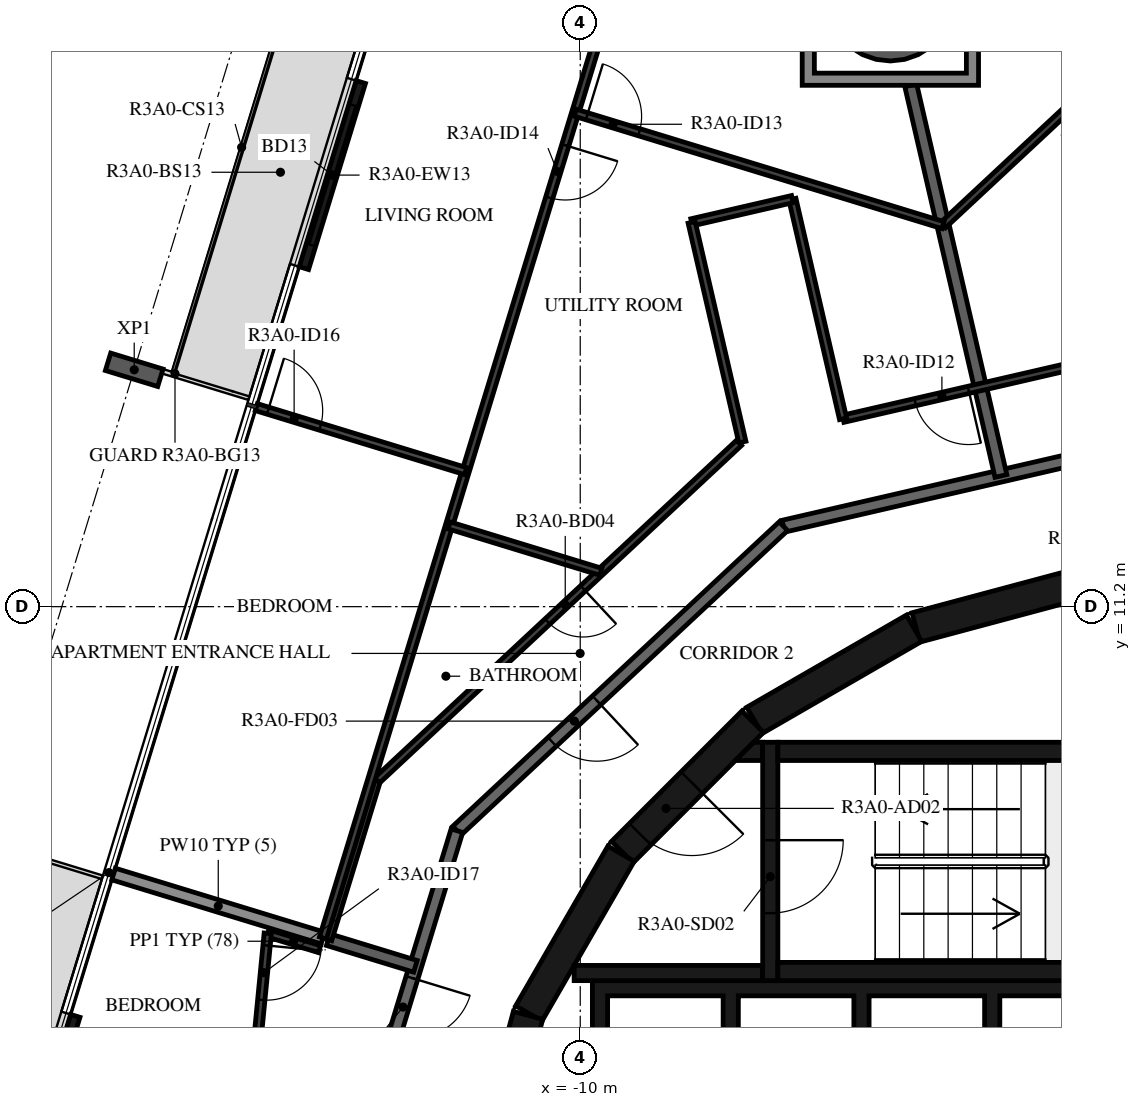
"""IFC4 building model, lengths in metres.
Left out: names, types, materials, properties, quantities, classifications, styles, units other than length and angle.
Written with IfcOpenShell. Run it as: python <this file> out.ifc"""

import sys

from ifc_helpers import new_model, si_unit, direction, frame, frame_2d, origin, origin_2d, place, context, subcontext, project, spatial, polyline, rectangle, hollow_circle, i_section, outline, extrude, element, fill, save


model = new_model("IFC4")
c1 = context("Model", 3, precision=1e-05, world=origin(), true_north=direction((0.0, 1.0)))
c2 = subcontext(c1, "Body", "Model", "MODEL_VIEW")
j1 = project(units=[si_unit("LENGTHUNIT", "METRE"), si_unit("PLANEANGLEUNIT", "RADIAN")], contexts=[c1])
p1 = place(None, origin())
s1 = spatial("IfcSite", under=j1, at=p1, CompositionType="ELEMENT")
p2 = place(p1, origin())
s2 = spatial("IfcBuilding", under=s1, at=p2, CompositionType="ELEMENT")
p3 = place(p2, frame((0.0, 0.0, 120.4)))
s3 = spatial("IfcBuildingStorey", under=s2, at=p3, CompositionType="ELEMENT", Elevation=120.4)
p4 = place(p3, frame((-4.9, 21.223, -0.38), z_axis=(0.0, 0.0, 1.0), x_axis=(1.0, 0.0, 0.0)))
e1 = element("IfcColumn", 1, at=p4, inside=s3, PredefinedType="COLUMN", context=c2, shape_type="SweptSolid", body=[
    extrude(hollow_circle(Radius=1.05, WallThickness=0.05, at=origin_2d()), origin(), (0.0, 0.0, 1.0), 3.5),
])
p5 = place(p3, frame((-17.335, 15.095, -0.38), z_axis=(0.0, 0.0, 1.0), x_axis=(0.29237190653, 0.956304694264, 0.0)))
e2 = element("IfcColumn", 2, at=p5, inside=s3, PredefinedType="COLUMN", context=c2, shape_type="SweptSolid", body=[
    extrude(i_section(OverallWidth=0.3, OverallDepth=0.9, WebThickness=0.019, FlangeThickness=0.035, FilletRadius=0.03, at=origin_2d()), origin(), (0.0, 0.0, 1.0), 3.5),
])
p6 = place(p3, frame((-13.609, 19.827, 0.0), z_axis=(0.0, 0.0, 1.0), x_axis=(-0.292348395078, -0.956311882126, 0.0)))
e3 = element("IfcWall", 3, at=p6, inside=s3, PredefinedType="STANDARD", context=c2, shape_type="SweptSolid", body=[
    extrude(rectangle(XDim=3.2, YDim=0.16, at=frame_2d((1.6, 0.0))), origin(), (0.0, 0.0, 1.0), 3.12),
])
p7 = place(p6, frame((0.4, 0.0, 0.0)))
e4 = element("IfcOpeningElement", 4, at=p7, cuts=e3, PredefinedType="OPENING", context=c2, shape_type="SweptSolid", body=[
    extrude(rectangle(XDim=2.4, YDim=2.4, at=frame_2d((1.2, 1.2))), frame((0.0, 0.09, 0.0), z_axis=(0.0, -1.0, 0.0), x_axis=(1.0, 0.0, 0.0)), (0.0, 0.0, 1.0), 0.18),
])
p8 = place(p3, frame((-18.304, 4.47, 0.0), z_axis=(0.0, 0.0, 1.0), x_axis=(-0.292348395078, -0.956311882126, 0.0)))
e5 = element("IfcWall", 5, at=p8, inside=s3, PredefinedType="STANDARD", context=c2, shape_type="SweptSolid", body=[
    extrude(rectangle(XDim=3.2, YDim=0.16, at=frame_2d((1.6, 0.0))), origin(), (0.0, 0.0, 1.0), 3.12),
])
p9 = place(p8, frame((0.4, 0.0, 0.0)))
e6 = element("IfcOpeningElement", 6, at=p9, cuts=e5, PredefinedType="OPENING", context=c2, shape_type="SweptSolid", body=[
    extrude(rectangle(XDim=2.4, YDim=2.4, at=frame_2d((1.2, 1.2))), frame((0.0, 0.09, 0.0), z_axis=(0.0, -1.0, 0.0), x_axis=(1.0, 0.0, 0.0)), (0.0, 0.0, 1.0), 0.18),
])
for number, where, z_axis, x_axis in (
    (7, (-1.55, 11.643, 0.0), (0.0, 0.0, 1.0), (-0.966, -0.259, 0.0)),
    (8, (-4.51, 10.845, 0.0), (0.0, 0.0, 1.0), (-0.866, -0.5, 0.0)),
):
    element("IfcWall", number, at=place(p3, frame(where, z_axis=z_axis, x_axis=x_axis)), inside=s3, PredefinedType="SHEAR", context=c2, shape_type="SweptSolid", body=[
        extrude(rectangle(XDim=3.033, YDim=0.5, at=frame_2d((1.516, 0.0))), origin(), (0.0, 0.0, 1.0), 3.12),
    ])
p10 = place(p3, frame((-7.164, 9.308, 0.0), z_axis=(0.0, 0.0, 1.0), x_axis=(-0.707106781187, -0.707106781187, 0.0)))
e9 = element("IfcWall", 9, at=p10, inside=s3, PredefinedType="SHEAR", context=c2, shape_type="SweptSolid", body=[
    extrude(rectangle(XDim=3.032, YDim=0.5, at=frame_2d((1.516, 0.0))), origin(), (0.0, 0.0, 1.0), 3.12),
])
p11 = place(p10, frame((1.416, 0.0, 0.0)))
e10 = element("IfcOpeningElement", 10, at=p11, cuts=e9, PredefinedType="OPENING", context=c2, shape_type="SweptSolid", body=[
    extrude(rectangle(XDim=1.2, YDim=2.1, at=frame_2d((0.6, 1.05))), frame((0.0, 0.26, 0.0), z_axis=(0.0, -1.0, 0.0), x_axis=(1.0, 0.0, 0.0)), (0.0, 0.0, 1.0), 0.52),
])
for number, where, z_axis, x_axis in (
    (11, (-9.329, 7.137, 0.0), (0.0, 0.0, 1.0), (-0.5, -0.866, 0.0)),
    (12, (-10.858, 4.479, 0.0), (0.0, 0.0, 1.0), (-0.259, -0.966, 0.0)),
):
    element("IfcWall", number, at=place(p3, frame(where, z_axis=z_axis, x_axis=x_axis)), inside=s3, PredefinedType="SHEAR", context=c2, shape_type="SweptSolid", body=[
        extrude(rectangle(XDim=3.033, YDim=0.5, at=frame_2d((1.516, 0.0))), origin(), (0.0, 0.0, 1.0), 3.12),
    ])
for number, where, z_axis, x_axis in (
    (13, (-6.75, 5.2, 0.0), (0.0, 0.0, 1.0), (1.0, 0.0, 0.0)),
    (14, (-6.75, 8.82, 0.0), (0.0, 0.0, 1.0), (1.0, 0.0, 0.0)),
):
    element("IfcWall", number, at=place(p3, frame(where, z_axis=z_axis, x_axis=x_axis)), inside=s3, PredefinedType="SHEAR", context=c2, shape_type="SweptSolid", body=[
        extrude(rectangle(XDim=6.75, YDim=0.3, at=frame_2d((3.375, 0.0))), origin(), (0.0, 0.0, 1.0), 3.12),
    ])
p12 = place(p3, frame((-6.875, 8.97, 0.0), z_axis=(0.0, 0.0, 1.0), x_axis=(0.0, -1.0, 0.0)))
e15 = element("IfcWall", 15, at=p12, inside=s3, PredefinedType="SHEAR", context=c2, shape_type="SweptSolid", body=[
    extrude(rectangle(XDim=3.92, YDim=0.25, at=frame_2d((1.96, 0.0))), origin(), (0.0, 0.0, 1.0), 3.12),
])
p13 = place(p12, frame((1.61, 0.0, 0.0)))
e16 = element("IfcOpeningElement", 16, at=p13, cuts=e15, PredefinedType="OPENING", context=c2, shape_type="SweptSolid", body=[
    extrude(rectangle(XDim=1.2, YDim=2.1, at=frame_2d((0.6, 1.05))), frame((0.0, 0.135, 0.0), z_axis=(0.0, -1.0, 0.0), x_axis=(1.0, 0.0, 0.0)), (0.0, 0.0, 1.0), 0.27),
])
p14 = place(p3, frame((-7.0, 5.175, 0.0), z_axis=(0.0, 0.0, 1.0), x_axis=(-1.0, 0.0, 0.0)))
e17 = element("IfcWall", 17, at=p14, inside=s3, PredefinedType="SHEAR", context=c2, shape_type="SweptSolid", body=[
    extrude(rectangle(XDim=3.1, YDim=0.25, at=frame_2d((1.55, 0.0))), origin(), (0.0, 0.0, 1.0), 3.12),
])
p15 = place(p3, origin())
e18 = element("IfcWall", 18, at=p15, inside=s3, PredefinedType="SHEAR", context=c2, shape_type="SweptSolid", body=[
    extrude(outline(polyline([(-7.148, 8.97), (-7.0, 8.97), (-7.0, 8.67), (-7.448, 8.67), (-7.148, 8.97)])), origin(), (0.0, 0.0, 1.0), 3.12),
])
p16 = place(p3, origin())
e19 = element("IfcWall", 19, at=p16, inside=s3, PredefinedType="SHEAR", context=c2, shape_type="SweptSolid", body=[
    extrude(outline(polyline([(-9.55, 4.8), (-7.65, 4.8), (-7.65, 1.9), (-7.4, 1.9), (-7.4, 4.8), (-5.5, 4.8), (-5.5, 1.9), (-5.25, 1.9), (-5.25, 4.8), (-3.35, 4.8), (-3.35, 1.9), (-3.1, 1.9), (-3.1, 4.8), (-1.2, 4.8), (-1.2, 1.9), (-0.95, 1.9), (-0.95, 4.8), (0.95, 4.8), (0.95, 1.9), (1.2, 1.9), (1.2, 4.8), (3.1, 4.8), (3.1, 1.9), (3.35, 1.9), (3.35, 4.8), (5.25, 4.8), (5.25, 1.9), (5.5, 1.9), (5.5, 4.8), (7.4, 4.8), (7.4, 1.9), (7.65, 1.9), (7.65, 4.8), (9.55, 4.8), (9.55, 1.9), (9.8, 1.9), (9.8, 4.8), (9.8, 5.05), (-9.8, 5.05), (-9.8, 4.8), (-9.8, 1.9), (-9.55, 1.9), (-9.55, 4.8)])), origin(), (0.0, 0.0, 1.0), 3.12),
])
p17 = place(p3, frame((0.495, 14.175, 0.0), z_axis=(0.0, 0.0, 1.0), x_axis=(-0.974376622151, -0.224922649383, 0.0)))
e20 = element("IfcWall", 20, at=p17, inside=s3, PredefinedType="STANDARD", context=c2, shape_type="SweptSolid", body=[
    extrude(rectangle(XDim=7.342, YDim=0.2, at=frame_2d((3.671, 0.0))), origin(), (0.0, 0.0, 1.0), 3.12),
])
p18 = place(p3, frame((-6.659, 12.523, 0.0), z_axis=(0.0, 0.0, 1.0), x_axis=(-0.731350455479, -0.682001841105, 0.0)))
e21 = element("IfcWall", 21, at=p18, inside=s3, PredefinedType="STANDARD", context=c2, shape_type="SweptSolid", body=[
    extrude(rectangle(XDim=7.342, YDim=0.2, at=frame_2d((3.671, 0.0))), origin(), (0.0, 0.0, 1.0), 3.12),
])
p19 = place(p18, frame((4.2, 0.0, 0.0)))
e22 = element("IfcOpeningElement", 22, at=p19, cuts=e21, PredefinedType="OPENING", context=c2, shape_type="SweptSolid", body=[
    extrude(rectangle(XDim=1.0, YDim=2.1, at=frame_2d((0.5, 1.05))), frame((0.0, 0.11, 0.0), z_axis=(0.0, -1.0, 0.0), x_axis=(1.0, 0.0, 0.0)), (0.0, 0.0, 1.0), 0.22),
])
p20 = place(p3, frame((-12.028, 7.516, 0.0), z_axis=(0.0, 0.0, 1.0), x_axis=(-0.292365533182, -0.956306642771, 0.0)))
e23 = element("IfcWall", 23, at=p20, inside=s3, PredefinedType="STANDARD", context=c2, shape_type="SweptSolid", body=[
    extrude(rectangle(XDim=7.342, YDim=0.2, at=frame_2d((3.671, 0.0))), origin(), (0.0, 0.0, 1.0), 3.12),
])
p21 = place(p20, frame((2.533, 0.0, 0.0)))
e24 = element("IfcOpeningElement", 24, at=p21, cuts=e23, PredefinedType="OPENING", context=c2, shape_type="SweptSolid", body=[
    extrude(rectangle(XDim=1.0, YDim=2.1, at=frame_2d((0.5, 1.05))), frame((0.0, 0.11, 0.0), z_axis=(0.0, -1.0, 0.0), x_axis=(1.0, 0.0, 0.0)), (0.0, 0.0, 1.0), 0.22),
])
p22 = place(p3, frame((-4.565, 19.773, 0.0), z_axis=(0.0, 0.0, 1.0), x_axis=(0.224940633072, -0.974372470667, 0.0)))
e25 = element("IfcWall", 25, at=p22, inside=s3, PredefinedType="STANDARD", context=c2, shape_type="SweptSolid", body=[
    extrude(rectangle(XDim=6.594, YDim=0.2, at=frame_2d((3.297, 0.0))), origin(), (0.0, 0.0, 1.0), 3.12),
])
p23 = place(p3, frame((-14.145, 5.724, 0.0), z_axis=(0.0, 0.0, 1.0), x_axis=(0.956266872747, -0.292495586439, 0.0)))
e26 = element("IfcWall", 26, at=p23, inside=s3, PredefinedType="STANDARD", context=c2, shape_type="SweptSolid", body=[
    extrude(rectangle(XDim=1.5, YDim=0.2, at=frame_2d((0.75, 0.0))), origin(), (0.0, 0.0, 1.0), 3.12),
])
p24 = place(p3, frame((-17.674, 6.803, 0.0), z_axis=(0.0, 0.0, 1.0), x_axis=(0.956293645939, -0.292408041504, 0.0)))
e27 = element("IfcWall", 27, at=p24, inside=s3, PredefinedType="STANDARD", context=c2, shape_type="SweptSolid", body=[
    extrude(rectangle(XDim=3.6, YDim=0.2, at=frame_2d((1.8, 0.0))), origin(), (0.0, 0.0, 1.0), 2.73),
])
p25 = place(p3, frame((-1.161, 15.332, 0.0), z_axis=(0.0, 0.0, 1.0), x_axis=(-0.974373440078, -0.224936433845, 0.0)))
e28 = element("IfcWall", 28, at=p25, inside=s3, PredefinedType="PARTITIONING", context=c2, shape_type="SweptSolid", body=[
    extrude(rectangle(XDim=4.636, YDim=0.12, at=frame_2d((2.318, 0.0))), origin(), (0.0, 0.0, 1.0), 3.12),
])
p26 = place(p25, frame((2.518, 0.0, 0.0)))
e29 = element("IfcOpeningElement", 29, at=p26, cuts=e28, PredefinedType="OPENING", context=c2, shape_type="SweptSolid", body=[
    extrude(rectangle(XDim=0.9, YDim=2.1, at=frame_2d((0.45, 1.05))), frame((0.0, 0.07, 0.0), z_axis=(0.0, -1.0, 0.0), x_axis=(1.0, 0.0, 0.0)), (0.0, 0.0, 1.0), 0.14),
])
p27 = place(p3, frame((0.591, 21.787, 0.0), z_axis=(0.0, 0.0, 1.0), x_axis=(-0.731363296574, -0.681988070588, 0.0)))
e30 = element("IfcWall", 30, at=p27, inside=s3, PredefinedType="PARTITIONING", context=c2, shape_type="SweptSolid", body=[
    extrude(rectangle(XDim=6.324, YDim=0.12, at=frame_2d((3.162, 0.0))), origin(), (0.0, 0.0, 1.0), 3.12),
])
p28 = place(p27, frame((0.6, 0.0, 0.0)))
e31 = element("IfcOpeningElement", 31, at=p28, cuts=e30, PredefinedType="OPENING", context=c2, shape_type="SweptSolid", body=[
    extrude(rectangle(XDim=0.9, YDim=2.1, at=frame_2d((0.45, 1.05))), frame((0.0, 0.07, 0.0), z_axis=(0.0, -1.0, 0.0), x_axis=(1.0, 0.0, 0.0)), (0.0, 0.0, 1.0), 0.14),
])
p29 = place(p3, frame((-5.677, 14.289, 0.0), z_axis=(0.0, 0.0, 1.0), x_axis=(-0.224960478174, 0.974367889075, 0.0)))
e32 = element("IfcWall", 32, at=p29, inside=s3, PredefinedType="PARTITIONING", context=c2, shape_type="SweptSolid", body=[
    extrude(rectangle(XDim=3.708, YDim=0.12, at=frame_2d((1.854, 0.0))), origin(), (0.0, 0.0, 1.0), 3.12),
])
p30 = place(p3, frame((-6.512, 17.902, 0.0), z_axis=(0.0, 0.0, 1.0), x_axis=(-0.974376669418, -0.224922444621, 0.0)))
e33 = element("IfcWall", 33, at=p30, inside=s3, PredefinedType="PARTITIONING", context=c2, shape_type="SweptSolid", body=[
    extrude(rectangle(XDim=1.7, YDim=0.12, at=frame_2d((0.85, 0.0))), origin(), (0.0, 0.0, 1.0), 3.12),
])
p31 = place(p3, frame((-8.168, 17.52, 0.0), z_axis=(0.0, 0.0, 1.0), x_axis=(0.224960478174, -0.974367889075, 0.0)))
e34 = element("IfcWall", 34, at=p31, inside=s3, PredefinedType="PARTITIONING", context=c2, shape_type="SweptSolid", body=[
    extrude(rectangle(XDim=3.708, YDim=0.12, at=frame_2d((1.854, 0.0))), origin(), (0.0, 0.0, 1.0), 3.12),
])
p32 = place(p3, frame((-7.388, 13.894, 0.0), z_axis=(0.0, 0.0, 1.0), x_axis=(-0.731357186721, -0.681994622729, 0.0)))
e35 = element("IfcWall", 35, at=p32, inside=s3, PredefinedType="PARTITIONING", context=c2, shape_type="SweptSolid", body=[
    extrude(rectangle(XDim=8.146, YDim=0.12, at=frame_2d((4.073, 0.0))), origin(), (0.0, 0.0, 1.0), 3.12),
])
p33 = place(p32, frame((3.509, 0.0, 0.0)))
e36 = element("IfcOpeningElement", 36, at=p33, cuts=e35, PredefinedType="OPENING", context=c2, shape_type="SweptSolid", body=[
    extrude(rectangle(XDim=0.8, YDim=2.1, at=frame_2d((0.4, 1.05))), frame((0.0, 0.07, 0.0), z_axis=(0.0, -1.0, 0.0), x_axis=(1.0, 0.0, 0.0)), (0.0, 0.0, 1.0), 0.14),
])
p34 = place(p3, frame((-13.345, 8.339, 0.0), z_axis=(0.0, 0.0, 1.0), x_axis=(-0.292316072367, -0.956321762712, 0.0)))
e37 = element("IfcWall", 37, at=p34, inside=s3, PredefinedType="PARTITIONING", context=c2, shape_type="SweptSolid", body=[
    extrude(rectangle(XDim=2.734, YDim=0.12, at=frame_2d((1.367, 0.0))), origin(), (0.0, 0.0, 1.0), 3.12),
])
p35 = place(p3, frame((-9.169, 22.31, 0.0), z_axis=(0.0, 0.0, 1.0), x_axis=(-0.29236145486, -0.956307889601, 0.0)))
e38 = element("IfcWall", 38, at=p35, inside=s3, PredefinedType="PARTITIONING", context=c2, shape_type="SweptSolid", body=[
    extrude(rectangle(XDim=17.316, YDim=0.12, at=frame_2d((8.658, 0.0))), origin(), (0.0, 0.0, 1.0), 3.12),
])
p36 = place(p35, frame((3.683, 0.0, 0.0)))
e39 = element("IfcOpeningElement", 39, at=p36, cuts=e38, PredefinedType="OPENING", context=c2, shape_type="SweptSolid", body=[
    extrude(rectangle(XDim=0.9, YDim=2.1, at=frame_2d((0.45, 1.05))), frame((0.0, 0.07, 0.0), z_axis=(0.0, -1.0, 0.0), x_axis=(1.0, 0.0, 0.0)), (0.0, 0.0, 1.0), 0.14),
])
p37 = place(p3, frame((-10.082, 19.323, 0.0), z_axis=(0.0, 0.0, 1.0), x_axis=(0.956300011431, -0.292387222936, 0.0)))
e40 = element("IfcWall", 40, at=p37, inside=s3, PredefinedType="PARTITIONING", context=c2, shape_type="SweptSolid", body=[
    extrude(rectangle(XDim=6.324, YDim=0.12, at=frame_2d((3.162, 0.0))), origin(), (0.0, 0.0, 1.0), 3.12),
])
p38 = place(p37, frame((0.2, 0.0, 0.0)))
e41 = element("IfcOpeningElement", 41, at=p38, cuts=e40, PredefinedType="OPENING", context=c2, shape_type="SweptSolid", body=[
    extrude(rectangle(XDim=0.9, YDim=2.1, at=frame_2d((0.45, 1.05))), frame((0.0, 0.07, 0.0), z_axis=(0.0, -1.0, 0.0), x_axis=(1.0, 0.0, 0.0)), (0.0, 0.0, 1.0), 0.14),
])
p39 = place(p3, frame((-12.157, 12.537, 0.0), z_axis=(0.0, 0.0, 1.0), x_axis=(0.956293441844, -0.292408708979, 0.0)))
e42 = element("IfcWall", 42, at=p39, inside=s3, PredefinedType="PARTITIONING", context=c2, shape_type="SweptSolid", body=[
    extrude(rectangle(XDim=2.609, YDim=0.12, at=frame_2d((1.305, 0.0))), origin(), (0.0, 0.0, 1.0), 3.12),
])
p40 = place(p3, frame((-15.327, 14.481, 0.0), z_axis=(0.0, 0.0, 1.0), x_axis=(0.956306810244, -0.292364985388, 0.0)))
e43 = element("IfcWall", 43, at=p40, inside=s3, PredefinedType="PARTITIONING", context=c2, shape_type="SweptSolid", body=[
    extrude(rectangle(XDim=3.6, YDim=0.12, at=frame_2d((1.8, 0.0))), origin(), (0.0, 0.0, 1.0), 2.73),
])
p41 = place(p40, frame((0.2, 0.0, 0.0)))
e44 = element("IfcOpeningElement", 44, at=p41, cuts=e43, PredefinedType="OPENING", context=c2, shape_type="SweptSolid", body=[
    extrude(rectangle(XDim=0.9, YDim=2.1, at=frame_2d((0.45, 1.05))), frame((0.0, 0.07, 0.0), z_axis=(0.0, -1.0, 0.0), x_axis=(1.0, 0.0, 0.0)), (0.0, 0.0, 1.0), 0.14),
])
p42 = place(p3, frame((-14.287, 5.568, 0.0), z_axis=(0.0, 0.0, 1.0), x_axis=(-0.956287662261, 0.292427609859, 0.0)))
e45 = element("IfcWall", 45, at=p42, inside=s3, PredefinedType="PARTITIONING", context=c2, shape_type="SweptSolid", body=[
    extrude(rectangle(XDim=0.89, YDim=0.12, at=frame_2d((0.445, 0.0))), origin(), (0.0, 0.0, 1.0), 3.12),
])
p43 = place(p3, frame((-15.138, 5.828, 0.0), z_axis=(0.0, 0.0, 1.0), x_axis=(-0.096967255409, -0.995287572201, 0.0)))
e46 = element("IfcWall", 46, at=p43, inside=s3, PredefinedType="PARTITIONING", context=c2, shape_type="SweptSolid", body=[
    extrude(rectangle(XDim=4.489, YDim=0.12, at=frame_2d((2.245, 0.0))), origin(), (0.0, 0.0, 1.0), 3.12),
])
p44 = place(p43, frame((0.2, 0.0, 0.0)))
e47 = element("IfcOpeningElement", 47, at=p44, cuts=e46, PredefinedType="OPENING", context=c2, shape_type="SweptSolid", body=[
    extrude(rectangle(XDim=0.9, YDim=2.1, at=frame_2d((0.45, 1.05))), frame((0.0, 0.07, 0.0), z_axis=(0.0, -1.0, 0.0), x_axis=(1.0, 0.0, 0.0)), (0.0, 0.0, 1.0), 0.14),
])
p45 = place(p3, origin())
e48 = element("IfcWall", 48, at=p45, inside=s3, PredefinedType="STANDARD", context=c2, shape_type="SweptSolid", body=[
    extrude(outline(polyline([(-3.45, 22.674), (-3.45, 19.773), (-6.35, 19.773), (-6.35, 22.674), (-3.45, 22.674)]), holes=[polyline([(-6.15, 19.973), (-3.65, 19.973), (-3.65, 22.473), (-6.15, 22.473), (-6.15, 19.973)])]), origin(), (0.0, 0.0, 1.0), 3.12),
])
p46 = place(p7, origin())
e49 = element("IfcDoor", 49, at=p46, inside=s3, OperationType="DOUBLE_DOOR_SLIDING", PredefinedType="DOOR", context=c2, shape_type="SweptSolid", body=[
    extrude(rectangle(XDim=2.4, YDim=2.4, at=frame_2d((1.2, 1.2))), frame((0.0, 0.025, 0.0), z_axis=(0.0, -1.0, 0.0), x_axis=(1.0, 0.0, 0.0)), (0.0, 0.0, 1.0), 0.05),
])
fill(e4, e49)
p47 = place(p13, origin())
e50 = element("IfcDoor", 50, at=p47, inside=s3, OperationType="SINGLE_SWING_LEFT", PredefinedType="DOOR", context=c2, shape_type="SweptSolid", body=[
    extrude(rectangle(XDim=1.2, YDim=2.1, at=frame_2d((0.6, 1.05))), frame((0.0, 0.025, 0.0), z_axis=(0.0, -1.0, 0.0), x_axis=(1.0, 0.0, 0.0)), (0.0, 0.0, 1.0), 0.05),
])
fill(e16, e50)
p48 = place(p11, origin())
e51 = element("IfcDoor", 51, at=p48, inside=s3, OperationType="SINGLE_SWING_RIGHT", PredefinedType="DOOR", context=c2, shape_type="SweptSolid", body=[
    extrude(rectangle(XDim=1.2, YDim=2.1, at=frame_2d((0.6, 1.05))), frame((0.0, 0.025, 0.0), z_axis=(0.0, -1.0, 0.0), x_axis=(1.0, 0.0, 0.0)), (0.0, 0.0, 1.0), 0.05),
])
fill(e10, e51)
p49 = place(p19, origin())
e52 = element("IfcDoor", 52, at=p49, inside=s3, OperationType="SINGLE_SWING_LEFT", PredefinedType="DOOR", context=c2, shape_type="SweptSolid", body=[
    extrude(rectangle(XDim=1.0, YDim=2.1, at=frame_2d((0.5, 1.05))), frame((0.0, 0.025, 0.0), z_axis=(0.0, -1.0, 0.0), x_axis=(1.0, 0.0, 0.0)), (0.0, 0.0, 1.0), 0.05),
])
fill(e22, e52)
p50 = place(p26, origin())
e53 = element("IfcDoor", 53, at=p50, inside=s3, OperationType="SINGLE_SWING_LEFT", PredefinedType="DOOR", context=c2, shape_type="SweptSolid", body=[
    extrude(rectangle(XDim=0.9, YDim=2.1, at=frame_2d((0.45, 1.05))), frame((0.0, 0.025, 0.0), z_axis=(0.0, -1.0, 0.0), x_axis=(1.0, 0.0, 0.0)), (0.0, 0.0, 1.0), 0.05),
])
fill(e29, e53)
p51 = place(p33, origin())
e54 = element("IfcDoor", 54, at=p51, inside=s3, OperationType="SINGLE_SWING_LEFT", PredefinedType="DOOR", context=c2, shape_type="SweptSolid", body=[
    extrude(rectangle(XDim=0.8, YDim=2.1, at=frame_2d((0.4, 1.05))), frame((0.0, 0.025, 0.0), z_axis=(0.0, -1.0, 0.0), x_axis=(1.0, 0.0, 0.0)), (0.0, 0.0, 1.0), 0.05),
])
fill(e36, e54)
p52 = place(p38, origin())
e55 = element("IfcDoor", 55, at=p52, inside=s3, OperationType="SINGLE_SWING_LEFT", PredefinedType="DOOR", context=c2, shape_type="SweptSolid", body=[
    extrude(rectangle(XDim=0.9, YDim=2.1, at=frame_2d((0.45, 1.05))), frame((0.0, 0.025, 0.0), z_axis=(0.0, -1.0, 0.0), x_axis=(1.0, 0.0, 0.0)), (0.0, 0.0, 1.0), 0.05),
])
fill(e41, e55)
p53 = place(p36, origin())
e56 = element("IfcDoor", 56, at=p53, inside=s3, OperationType="SINGLE_SWING_LEFT", PredefinedType="DOOR", context=c2, shape_type="SweptSolid", body=[
    extrude(rectangle(XDim=0.9, YDim=2.1, at=frame_2d((0.45, 1.05))), frame((0.0, 0.025, 0.0), z_axis=(0.0, -1.0, 0.0), x_axis=(1.0, 0.0, 0.0)), (0.0, 0.0, 1.0), 0.05),
])
fill(e39, e56)
p54 = place(p41, origin())
e57 = element("IfcDoor", 57, at=p54, inside=s3, OperationType="SINGLE_SWING_RIGHT", PredefinedType="DOOR", context=c2, shape_type="SweptSolid", body=[
    extrude(rectangle(XDim=0.9, YDim=2.1, at=frame_2d((0.45, 1.05))), frame((0.0, 0.025, 0.0), z_axis=(0.0, -1.0, 0.0), x_axis=(1.0, 0.0, 0.0)), (0.0, 0.0, 1.0), 0.05),
])
fill(e44, e57)
p55 = place(p21, origin())
e58 = element("IfcDoor", 58, at=p55, inside=s3, OperationType="SINGLE_SWING_LEFT", PredefinedType="DOOR", context=c2, shape_type="SweptSolid", body=[
    extrude(rectangle(XDim=1.0, YDim=2.1, at=frame_2d((0.5, 1.05))), frame((0.0, 0.025, 0.0), z_axis=(0.0, -1.0, 0.0), x_axis=(1.0, 0.0, 0.0)), (0.0, 0.0, 1.0), 0.05),
])
fill(e24, e58)
p56 = place(p44, origin())
e59 = element("IfcDoor", 59, at=p56, inside=s3, OperationType="SINGLE_SWING_LEFT", PredefinedType="DOOR", context=c2, shape_type="SweptSolid", body=[
    extrude(rectangle(XDim=0.9, YDim=2.1, at=frame_2d((0.45, 1.05))), frame((0.0, 0.025, 0.0), z_axis=(0.0, -1.0, 0.0), x_axis=(1.0, 0.0, 0.0)), (0.0, 0.0, 1.0), 0.05),
])
fill(e47, e59)
save(model, sys.argv[1])
